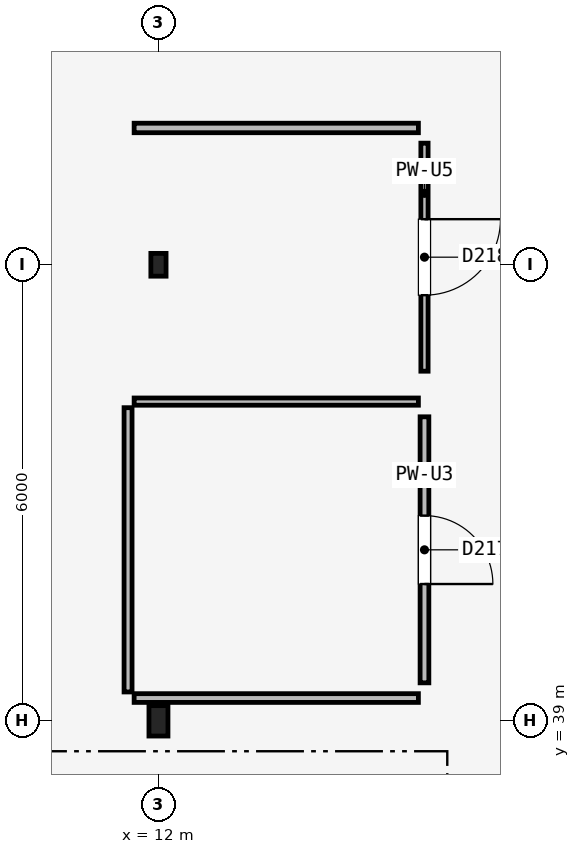
"""IFC4 building model, lengths in metres.
Left out: names, types, materials, properties, quantities, classifications, styles, units other than length and angle.
Written with IfcOpenShell. Run it as: python <this file> out.ifc"""

import sys

from ifc_helpers import new_model, si_unit, direction, frame, frame_2d, origin, origin_2d, place, context, subcontext, project, spatial, rectangle, hollow_rectangle, i_section, extrude, element, fill, save


model = new_model("IFC4")
c1 = context("Model", 3, precision=1e-05, world=origin(), true_north=direction((0.0, 1.0)))
c2 = subcontext(c1, "Body", "Model", "MODEL_VIEW")
j1 = project(units=[si_unit("LENGTHUNIT", "METRE"), si_unit("PLANEANGLEUNIT", "RADIAN")], contexts=[c1])
p1 = place(None, origin())
s1 = spatial("IfcSite", under=j1, at=p1, CompositionType="ELEMENT")
p2 = place(p1, origin())
s2 = spatial("IfcBuilding", under=s1, at=p2, CompositionType="ELEMENT")
p3 = place(p2, frame((0.0, 0.0, 9.3)))
s3 = spatial("IfcBuildingStorey", under=s2, at=p3, CompositionType="ELEMENT", Elevation=9.3)
p4 = place(p3, frame((12.0, 39.0, 0.0), z_axis=(0.0, 0.0, 1.0), x_axis=(1.0, 0.0, 0.0)))
e1 = element("IfcColumn", 1, at=p4, inside=s3, PredefinedType="COLUMN", context=c2, shape_type="SweptSolid", body=[
    extrude(i_section(OverallWidth=0.25, OverallDepth=0.4, WebThickness=0.01, FlangeThickness=0.013, FilletRadius=0.014, at=origin_2d()), origin(), (0.0, 0.0, 1.0), 4.2),
])
p5 = place(p3, frame((12.0, 45.0, 0.0), z_axis=(0.0, 0.0, 1.0), x_axis=(1.0, 0.0, 0.0)))
e2 = element("IfcColumn", 2, at=p5, inside=s3, PredefinedType="COLUMN", context=c2, shape_type="SweptSolid", body=[
    extrude(hollow_rectangle(XDim=0.2, YDim=0.3, WallThickness=0.012, InnerFilletRadius=0.012, OuterFilletRadius=0.024, at=origin_2d()), origin(), (0.0, 0.0, 1.0), 4.2),
])
p6 = place(p3, frame((15.5, 43.0, 0.0), z_axis=(0.0, 0.0, 1.0), x_axis=(0.0, -1.0, 0.0)))
e3 = element("IfcWall", 3, at=p6, inside=s3, PredefinedType="PARTITIONING", context=c2, shape_type="SweptSolid", body=[
    extrude(rectangle(XDim=3.5, YDim=0.115, at=frame_2d((1.75, 0.0))), origin(), (0.0, 0.0, 1.0), 3.89),
])
p7 = place(p6, frame((1.3, 0.0, 0.0)))
e4 = element("IfcOpeningElement", 4, at=p7, cuts=e3, PredefinedType="OPENING", context=c2, shape_type="SweptSolid", body=[
    extrude(rectangle(XDim=0.9, YDim=2.1, at=frame_2d((0.45, 1.05))), frame((0.0, 0.067, 0.0), z_axis=(0.0, -1.0, 0.0), x_axis=(1.0, 0.0, 0.0)), (0.0, 0.0, 1.0), 0.135),
])
p8 = place(p3, frame((15.5, 46.6, 0.0), z_axis=(0.0, 0.0, 1.0), x_axis=(0.0, -1.0, 0.0)))
e5 = element("IfcWall", 5, at=p8, inside=s3, PredefinedType="PARTITIONING", context=c2, shape_type="SweptSolid", body=[
    extrude(rectangle(XDim=3.0, YDim=0.095, at=frame_2d((1.5, 0.0))), origin(), (0.0, 0.0, 1.0), 3.49),
])
p9 = place(p8, frame((1.0, 0.0, 0.0)))
e6 = element("IfcOpeningElement", 6, at=p9, cuts=e5, PredefinedType="OPENING", context=c2, shape_type="SweptSolid", body=[
    extrude(rectangle(XDim=1.0, YDim=2.1, at=frame_2d((0.5, 1.05))), frame((0.0, 0.057, 0.0), z_axis=(0.0, -1.0, 0.0), x_axis=(1.0, 0.0, 0.0)), (0.0, 0.0, 1.0), 0.115),
])
p10 = place(p3, frame((15.42, 39.3, 0.0), z_axis=(0.0, 0.0, 1.0), x_axis=(-1.0, 0.0, 0.0)))
e7 = element("IfcWall", 7, at=p10, inside=s3, PredefinedType="PARTITIONING", context=c2, shape_type="SweptSolid", body=[
    extrude(rectangle(XDim=3.74, YDim=0.115, at=frame_2d((1.87, 0.0))), origin(), (0.0, 0.0, 1.0), 3.484),
])
p11 = place(p3, frame((11.6, 39.38, 0.0), z_axis=(0.0, 0.0, 1.0), x_axis=(0.0, 1.0, 0.0)))
e8 = element("IfcWall", 8, at=p11, inside=s3, PredefinedType="PARTITIONING", context=c2, shape_type="SweptSolid", body=[
    extrude(rectangle(XDim=3.74, YDim=0.105, at=frame_2d((1.87, 0.0))), origin(), (0.0, 0.0, 1.0), 3.89),
])
p12 = place(p3, frame((11.68, 43.2, 0.0), z_axis=(0.0, 0.0, 1.0), x_axis=(1.0, 0.0, 0.0)))
e9 = element("IfcWall", 9, at=p12, inside=s3, PredefinedType="PARTITIONING", context=c2, shape_type="SweptSolid", body=[
    extrude(rectangle(XDim=3.74, YDim=0.095, at=frame_2d((1.87, 0.0))), origin(), (0.0, 0.0, 1.0), 3.566),
])
p13 = place(p3, frame((11.68, 46.8, 0.0), z_axis=(0.0, 0.0, 1.0), x_axis=(1.0, 0.0, 0.0)))
e10 = element("IfcWall", 10, at=p13, inside=s3, PredefinedType="PARTITIONING", context=c2, shape_type="SweptSolid", body=[
    extrude(rectangle(XDim=3.74, YDim=0.125, at=frame_2d((1.87, 0.0))), origin(), (0.0, 0.0, 1.0), 3.39),
])
p14 = place(p7, origin())
e11 = element("IfcDoor", 11, at=p14, inside=s3, OperationType="SINGLE_SWING_RIGHT", PredefinedType="DOOR", context=c2, shape_type="SweptSolid", body=[
    extrude(rectangle(XDim=0.9, YDim=2.1, at=frame_2d((0.45, 1.05))), frame((0.0, 0.025, 0.0), z_axis=(0.0, -1.0, 0.0), x_axis=(1.0, 0.0, 0.0)), (0.0, 0.0, 1.0), 0.05),
])
fill(e4, e11)
p15 = place(p9, origin())
e12 = element("IfcDoor", 12, at=p15, inside=s3, OperationType="SINGLE_SWING_LEFT", PredefinedType="DOOR", context=c2, shape_type="SweptSolid", body=[
    extrude(rectangle(XDim=1.0, YDim=2.1, at=frame_2d((0.5, 1.05))), frame((0.0, 0.025, 0.0), z_axis=(0.0, -1.0, 0.0), x_axis=(1.0, 0.0, 0.0)), (0.0, 0.0, 1.0), 0.05),
])
fill(e6, e12)
save(model, sys.argv[1])
